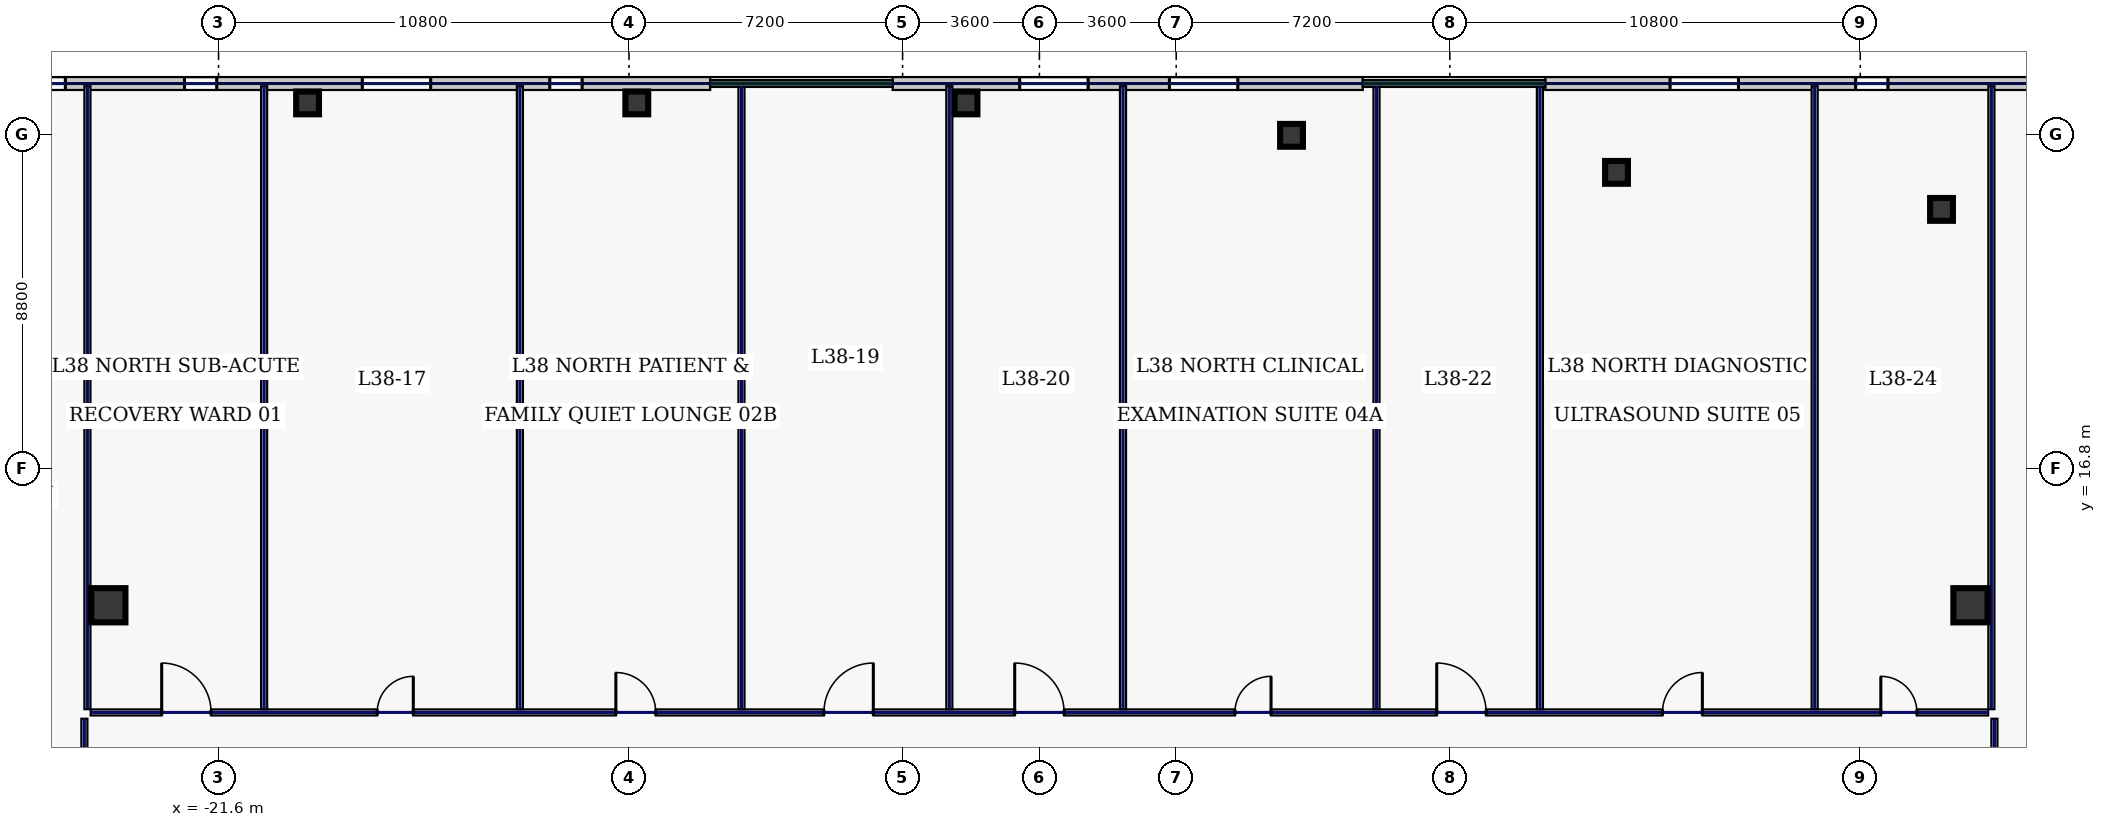
"""IFC4 building model, lengths in metres.
Left out: names, types, materials, properties, quantities, classifications, styles, units other than length and angle.
Written with IfcOpenShell. Run it as: python <this file> out.ifc"""

import sys

from ifc_helpers import new_model, si_unit, direction, frame, frame_2d, origin, origin_2d, place, context, subcontext, project, spatial, rectangle, hollow_rectangle, extrude, element, fill, save


model = new_model("IFC4")
c1 = context("Model", 3, precision=1e-05, world=origin(), true_north=direction((0.0, 1.0)))
c2 = subcontext(c1, "Body", "Model", "MODEL_VIEW")
j1 = project(units=[si_unit("LENGTHUNIT", "METRE"), si_unit("PLANEANGLEUNIT", "RADIAN")], contexts=[c1])
p1 = place(None, origin())
s1 = spatial("IfcSite", under=j1, at=p1, CompositionType="ELEMENT")
p2 = place(p1, origin())
s2 = spatial("IfcBuilding", under=s1, at=p2, CompositionType="ELEMENT")
p3 = place(p2, frame((0.0, 0.0, 168.2)))
s3 = spatial("IfcBuildingStorey", under=s2, at=p3, CompositionType="ELEMENT", Elevation=168.2)
for number, where, z_axis, x_axis in (
    (1, (-24.5, 13.2, 0.0), (0.0, 0.0, 1.0), (1.0, 0.0, 0.0)),
    (2, (24.5, 13.2, 0.0), (0.0, 0.0, 1.0), (1.0, 0.0, 0.0)),
):
    element("IfcColumn", number, at=place(p3, frame(where, z_axis=z_axis, x_axis=x_axis)), inside=s3, PredefinedType="COLUMN", context=c2, shape_type="SweptSolid", body=[
        extrude(hollow_rectangle(XDim=0.9, YDim=0.9, WallThickness=0.04, at=origin_2d()), origin(), (0.0, 0.0, 1.0), 3.74),
    ])
for number, where, z_axis, x_axis in (
    (3, (23.738, 23.618, 0.0), (0.0, 0.0, 1.0), (1.0, 0.0, 0.0)),
    (4, (15.186, 24.592, 0.0), (0.0, 0.0, 1.0), (1.0, 0.0, 0.0)),
    (5, (6.634, 25.567, 0.0), (0.0, 0.0, 1.0), (1.0, 0.0, 0.0)),
    (6, (-1.931, 26.42, 0.0), (0.0, 0.0, 1.0), (1.0, 0.0, 0.0)),
    (7, (-10.594, 26.42, 0.0), (0.0, 0.0, 1.0), (1.0, 0.0, 0.0)),
    (8, (-19.257, 26.42, 0.0), (0.0, 0.0, 1.0), (1.0, 0.0, 0.0)),
):
    element("IfcColumn", number, at=place(p3, frame(where, z_axis=z_axis, x_axis=x_axis)), inside=s3, PredefinedType="COLUMN", context=c2, shape_type="SweptSolid", body=[
        extrude(hollow_rectangle(XDim=0.6, YDim=0.6, WallThickness=0.028, at=origin_2d()), origin(), (0.0, 0.0, 1.0), 3.74),
    ])
p4 = place(p3, frame((33.4, 26.93, 0.0), z_axis=(0.0, 0.0, 1.0), x_axis=(-1.0, 0.0, 0.0)))
e9 = element("IfcWall", 9, at=p4, inside=s3, PredefinedType="STANDARD", context=c2, shape_type="SweptSolid", body=[
    extrude(rectangle(XDim=20.09, YDim=0.34, at=frame_2d((10.045, 0.0))), origin(), (0.0, 0.0, 1.0), 3.74),
])
p5 = place(p4, frame((15.005, 0.0, 0.7)))
e10 = element("IfcOpeningElement", 10, at=p5, cuts=e9, PredefinedType="OPENING", context=c2, shape_type="SweptSolid", body=[
    extrude(rectangle(XDim=1.8, YDim=2.2, at=frame_2d((0.9, 1.1))), frame((0.0, 0.18, 0.0), z_axis=(0.0, -1.0, 0.0), x_axis=(1.0, 0.0, 0.0)), (0.0, 0.0, 1.0), 0.36),
])
p6 = place(p4, frame((11.071, 0.0, 0.7)))
e11 = element("IfcOpeningElement", 11, at=p6, cuts=e9, PredefinedType="OPENING", context=c2, shape_type="SweptSolid", body=[
    extrude(rectangle(XDim=0.85, YDim=1.85, at=frame_2d((0.425, 0.925))), frame((0.0, 0.18, 0.0), z_axis=(0.0, -1.0, 0.0), x_axis=(1.0, 0.0, 0.0)), (0.0, 0.0, 1.0), 0.36),
])
p7 = place(p4, frame((6.48, 0.0, 0.7)))
e12 = element("IfcOpeningElement", 12, at=p7, cuts=e9, PredefinedType="OPENING", context=c2, shape_type="SweptSolid", body=[
    extrude(rectangle(XDim=0.85, YDim=1.85, at=frame_2d((0.425, 0.925))), frame((0.0, 0.18, 0.0), z_axis=(0.0, -1.0, 0.0), x_axis=(1.0, 0.0, 0.0)), (0.0, 0.0, 1.0), 0.36),
])
p8 = place(p4, frame((2.591, 0.0, 0.7)))
e13 = element("IfcOpeningElement", 13, at=p8, cuts=e9, PredefinedType="OPENING", context=c2, shape_type="SweptSolid", body=[
    extrude(rectangle(XDim=1.8, YDim=2.2, at=frame_2d((0.9, 1.1))), frame((0.0, 0.18, 0.0), z_axis=(0.0, -1.0, 0.0), x_axis=(1.0, 0.0, 0.0)), (0.0, 0.0, 1.0), 0.36),
])
p9 = place(p3, frame((8.51, 26.93, 0.0), z_axis=(0.0, 0.0, 1.0), x_axis=(-1.0, 0.0, 0.0)))
e14 = element("IfcWall", 14, at=p9, inside=s3, PredefinedType="STANDARD", context=c2, shape_type="SweptSolid", body=[
    extrude(rectangle(XDim=12.373, YDim=0.34, at=frame_2d((6.187, 0.0))), origin(), (0.0, 0.0, 1.0), 3.74),
])
p10 = place(p9, frame((7.229, 0.0, 0.7)))
e15 = element("IfcOpeningElement", 15, at=p10, cuts=e14, PredefinedType="OPENING", context=c2, shape_type="SweptSolid", body=[
    extrude(rectangle(XDim=1.8, YDim=2.2, at=frame_2d((0.9, 1.1))), frame((0.0, 0.18, 0.0), z_axis=(0.0, -1.0, 0.0), x_axis=(1.0, 0.0, 0.0)), (0.0, 0.0, 1.0), 0.36),
])
p11 = place(p9, frame((3.289, 0.0, 0.7)))
e16 = element("IfcOpeningElement", 16, at=p11, cuts=e14, PredefinedType="OPENING", context=c2, shape_type="SweptSolid", body=[
    extrude(rectangle(XDim=1.8, YDim=2.2, at=frame_2d((0.9, 1.1))), frame((0.0, 0.18, 0.0), z_axis=(0.0, -1.0, 0.0), x_axis=(1.0, 0.0, 0.0)), (0.0, 0.0, 1.0), 0.36),
])
p12 = place(p3, frame((-8.663, 26.93, 0.0), z_axis=(0.0, 0.0, 1.0), x_axis=(-1.0, 0.0, 0.0)))
e17 = element("IfcWall", 17, at=p12, inside=s3, PredefinedType="STANDARD", context=c2, shape_type="SweptSolid", body=[
    extrude(rectangle(XDim=19.937, YDim=0.34, at=frame_2d((9.969, 0.0))), origin(), (0.0, 0.0, 1.0), 3.74),
])
p13 = place(p12, frame((16.968, 0.0, 0.7)))
e18 = element("IfcOpeningElement", 18, at=p13, cuts=e17, PredefinedType="OPENING", context=c2, shape_type="SweptSolid", body=[
    extrude(rectangle(XDim=0.85, YDim=1.85, at=frame_2d((0.425, 0.925))), frame((0.0, 0.18, 0.0), z_axis=(0.0, -1.0, 0.0), x_axis=(1.0, 0.0, 0.0)), (0.0, 0.0, 1.0), 0.36),
])
p14 = place(p12, frame((12.983, 0.0, 0.7)))
e19 = element("IfcOpeningElement", 19, at=p14, cuts=e17, PredefinedType="OPENING", context=c2, shape_type="SweptSolid", body=[
    extrude(rectangle(XDim=0.85, YDim=1.85, at=frame_2d((0.425, 0.925))), frame((0.0, 0.18, 0.0), z_axis=(0.0, -1.0, 0.0), x_axis=(1.0, 0.0, 0.0)), (0.0, 0.0, 1.0), 0.36),
])
p15 = place(p12, frame((7.355, 0.0, 0.7)))
e20 = element("IfcOpeningElement", 20, at=p15, cuts=e17, PredefinedType="OPENING", context=c2, shape_type="SweptSolid", body=[
    extrude(rectangle(XDim=1.8, YDim=2.2, at=frame_2d((0.9, 1.1))), frame((0.0, 0.18, 0.0), z_axis=(0.0, -1.0, 0.0), x_axis=(1.0, 0.0, 0.0)), (0.0, 0.0, 1.0), 0.36),
])
p16 = place(p12, frame((3.371, 0.0, 0.7)))
e21 = element("IfcOpeningElement", 21, at=p16, cuts=e17, PredefinedType="OPENING", context=c2, shape_type="SweptSolid", body=[
    extrude(rectangle(XDim=0.85, YDim=1.85, at=frame_2d((0.425, 0.925))), frame((0.0, 0.18, 0.0), z_axis=(0.0, -1.0, 0.0), x_axis=(1.0, 0.0, 0.0)), (0.0, 0.0, 1.0), 0.36),
])
p17 = place(p3, frame((-25.13, 7.235, 0.0), z_axis=(0.0, 0.0, 1.0), x_axis=(0.0, 1.0, 0.0)))
e22 = element("IfcWall", 22, at=p17, inside=s3, PredefinedType="PARTITIONING", context=c2, shape_type="SweptSolid", body=[
    extrude(rectangle(XDim=2.98, YDim=0.16, at=frame_2d((1.49, 0.0))), origin(), (0.0, 0.0, 1.0), 3.74),
])
p18 = place(p17, frame((1.1, 0.0, 0.0)))
e23 = element("IfcOpeningElement", 23, at=p18, cuts=e22, PredefinedType="OPENING", context=c2, shape_type="SweptSolid", body=[
    extrude(rectangle(XDim=0.95, YDim=2.2, at=frame_2d((0.475, 1.1))), frame((0.0, 0.09, 0.0), z_axis=(0.0, -1.0, 0.0), x_axis=(1.0, 0.0, 0.0)), (0.0, 0.0, 1.0), 0.18),
])
p19 = place(p3, frame((-24.965, 10.38, 0.0), z_axis=(0.0, 0.0, 1.0), x_axis=(1.0, 0.0, 0.0)))
e24 = element("IfcWall", 24, at=p19, inside=s3, PredefinedType="PARTITIONING", context=c2, shape_type="SweptSolid", body=[
    extrude(rectangle(XDim=49.93, YDim=0.16, at=frame_2d((24.965, 0.0))), origin(), (0.0, 0.0, 1.0), 3.74),
])
p20 = place(p19, frame((1.869, 0.0, 0.0)))
e25 = element("IfcOpeningElement", 25, at=p20, cuts=e24, PredefinedType="OPENING", context=c2, shape_type="SweptSolid", body=[
    extrude(rectangle(XDim=1.3, YDim=2.2, at=frame_2d((0.65, 1.1))), frame((0.0, 0.09, 0.0), z_axis=(0.0, -1.0, 0.0), x_axis=(1.0, 0.0, 0.0)), (0.0, 0.0, 1.0), 0.18),
])
p21 = place(p19, frame((7.54, 0.0, 0.0)))
e26 = element("IfcOpeningElement", 26, at=p21, cuts=e24, PredefinedType="OPENING", context=c2, shape_type="SweptSolid", body=[
    extrude(rectangle(XDim=0.95, YDim=2.2, at=frame_2d((0.475, 1.1))), frame((0.0, 0.09, 0.0), z_axis=(0.0, -1.0, 0.0), x_axis=(1.0, 0.0, 0.0)), (0.0, 0.0, 1.0), 0.18),
])
p22 = place(p19, frame((13.82, 0.0, 0.0)))
e27 = element("IfcOpeningElement", 27, at=p22, cuts=e24, PredefinedType="OPENING", context=c2, shape_type="SweptSolid", body=[
    extrude(rectangle(XDim=1.05, YDim=2.2, at=frame_2d((0.525, 1.1))), frame((0.0, 0.09, 0.0), z_axis=(0.0, -1.0, 0.0), x_axis=(1.0, 0.0, 0.0)), (0.0, 0.0, 1.0), 0.18),
])
p23 = place(p19, frame((19.295, 0.0, 0.0)))
e28 = element("IfcOpeningElement", 28, at=p23, cuts=e24, PredefinedType="OPENING", context=c2, shape_type="SweptSolid", body=[
    extrude(rectangle(XDim=1.3, YDim=2.2, at=frame_2d((0.65, 1.1))), frame((0.0, 0.09, 0.0), z_axis=(0.0, -1.0, 0.0), x_axis=(1.0, 0.0, 0.0)), (0.0, 0.0, 1.0), 0.18),
])
p24 = place(p19, frame((24.315, 0.0, 0.0)))
e29 = element("IfcOpeningElement", 29, at=p24, cuts=e24, PredefinedType="OPENING", context=c2, shape_type="SweptSolid", body=[
    extrude(rectangle(XDim=1.3, YDim=2.2, at=frame_2d((0.65, 1.1))), frame((0.0, 0.09, 0.0), z_axis=(0.0, -1.0, 0.0), x_axis=(1.0, 0.0, 0.0)), (0.0, 0.0, 1.0), 0.18),
])
p25 = place(p19, frame((30.11, 0.0, 0.0)))
e30 = element("IfcOpeningElement", 30, at=p25, cuts=e24, PredefinedType="OPENING", context=c2, shape_type="SweptSolid", body=[
    extrude(rectangle(XDim=0.95, YDim=2.2, at=frame_2d((0.475, 1.1))), frame((0.0, 0.09, 0.0), z_axis=(0.0, -1.0, 0.0), x_axis=(1.0, 0.0, 0.0)), (0.0, 0.0, 1.0), 0.18),
])
p26 = place(p19, frame((35.42, 0.0, 0.0)))
e31 = element("IfcOpeningElement", 31, at=p26, cuts=e24, PredefinedType="OPENING", context=c2, shape_type="SweptSolid", body=[
    extrude(rectangle(XDim=1.3, YDim=2.2, at=frame_2d((0.65, 1.1))), frame((0.0, 0.09, 0.0), z_axis=(0.0, -1.0, 0.0), x_axis=(1.0, 0.0, 0.0)), (0.0, 0.0, 1.0), 0.18),
])
p27 = place(p19, frame((41.36, 0.0, 0.0)))
e32 = element("IfcOpeningElement", 32, at=p27, cuts=e24, PredefinedType="OPENING", context=c2, shape_type="SweptSolid", body=[
    extrude(rectangle(XDim=1.05, YDim=2.2, at=frame_2d((0.525, 1.1))), frame((0.0, 0.09, 0.0), z_axis=(0.0, -1.0, 0.0), x_axis=(1.0, 0.0, 0.0)), (0.0, 0.0, 1.0), 0.18),
])
p28 = place(p19, frame((47.106, 0.0, 0.0)))
e33 = element("IfcOpeningElement", 33, at=p28, cuts=e24, PredefinedType="OPENING", context=c2, shape_type="SweptSolid", body=[
    extrude(rectangle(XDim=0.95, YDim=2.2, at=frame_2d((0.475, 1.1))), frame((0.0, 0.09, 0.0), z_axis=(0.0, -1.0, 0.0), x_axis=(1.0, 0.0, 0.0)), (0.0, 0.0, 1.0), 0.18),
])
p29 = place(p3, frame((25.13, 10.215, 0.0), z_axis=(0.0, 0.0, 1.0), x_axis=(0.0, -1.0, 0.0)))
e34 = element("IfcWall", 34, at=p29, inside=s3, PredefinedType="PARTITIONING", context=c2, shape_type="SweptSolid", body=[
    extrude(rectangle(XDim=2.98, YDim=0.16, at=frame_2d((1.49, 0.0))), origin(), (0.0, 0.0, 1.0), 3.74),
])
p30 = place(p29, frame((1.1, 0.0, 0.0)))
e35 = element("IfcOpeningElement", 35, at=p30, cuts=e34, PredefinedType="OPENING", context=c2, shape_type="SweptSolid", body=[
    extrude(rectangle(XDim=0.95, YDim=2.2, at=frame_2d((0.475, 1.1))), frame((0.0, 0.09, 0.0), z_axis=(0.0, -1.0, 0.0), x_axis=(1.0, 0.0, 0.0)), (0.0, 0.0, 1.0), 0.18),
])
p31 = place(p3, frame((-25.05, 10.465, 0.0), z_axis=(0.0, 0.0, 1.0), x_axis=(0.0, 1.0, 0.0)))
e36 = element("IfcWall", 36, at=p31, inside=s3, PredefinedType="PARTITIONING", context=c2, shape_type="SweptSolid", body=[
    extrude(rectangle(XDim=16.395, YDim=0.16, at=frame_2d((8.198, 0.0))), origin(), (0.0, 0.0, 1.0), 3.285),
])
for number, where, z_axis, x_axis in (
    (37, (25.05, 10.465, 0.0), (0.0, 0.0, 1.0), (0.0, 1.0, 0.0)),
    (38, (-20.4, 10.465, 0.0), (0.0, 0.0, 1.0), (0.0, 1.0, 0.0)),
    (39, (-7.84, 10.465, 0.0), (0.0, 0.0, 1.0), (0.0, 1.0, 0.0)),
    (40, (2.2, 10.465, 0.0), (0.0, 0.0, 1.0), (0.0, 1.0, 0.0)),
    (41, (13.17, 10.465, 0.0), (0.0, 0.0, 1.0), (0.0, 1.0, 0.0)),
    (42, (20.4, 10.465, 0.0), (0.0, 0.0, 1.0), (0.0, 1.0, 0.0)),
    (43, (-13.67, 10.465, 0.0), (0.0, 0.0, 1.0), (0.0, 1.0, 0.0)),
):
    element("IfcWall", number, at=place(p3, frame(where, z_axis=z_axis, x_axis=x_axis)), inside=s3, PredefinedType="PARTITIONING", context=c2, shape_type="SweptSolid", body=[
        extrude(rectangle(XDim=16.395, YDim=0.16, at=frame_2d((8.198, 0.0))), origin(), (0.0, 0.0, 1.0), 3.74),
    ])
p32 = place(p3, frame((-2.37, 10.465, 0.0), z_axis=(0.0, 0.0, 1.0), x_axis=(0.0, 1.0, 0.0)))
e44 = element("IfcWall", 44, at=p32, inside=s3, PredefinedType="PARTITIONING", context=c2, shape_type="SweptSolid", body=[
    extrude(rectangle(XDim=16.395, YDim=0.16, at=frame_2d((8.198, 0.0))), origin(), (0.0, 0.0, 1.0), 3.285),
])
p33 = place(p3, frame((8.87, 10.465, 0.0), z_axis=(0.0, 0.0, 1.0), x_axis=(0.0, 1.0, 0.0)))
e45 = element("IfcWall", 45, at=p33, inside=s3, PredefinedType="PARTITIONING", context=c2, shape_type="SweptSolid", body=[
    extrude(rectangle(XDim=16.395, YDim=0.16, at=frame_2d((8.198, 0.0))), origin(), (0.0, 0.0, 1.0), 3.74),
])
p34 = place(p5, origin())
e46 = element("IfcWindow", 46, at=p34, inside=s3, PartitioningType="SINGLE_PANEL", PredefinedType="WINDOW", context=c2, shape_type="SweptSolid", body=[
    extrude(rectangle(XDim=1.8, YDim=2.2, at=frame_2d((0.9, 1.1))), frame((0.0, 0.03, 0.0), z_axis=(0.0, -1.0, 0.0), x_axis=(1.0, 0.0, 0.0)), (0.0, 0.0, 1.0), 0.06),
])
fill(e10, e46)
p35 = place(p6, origin())
e47 = element("IfcWindow", 47, at=p35, inside=s3, PartitioningType="SINGLE_PANEL", PredefinedType="WINDOW", context=c2, shape_type="SweptSolid", body=[
    extrude(rectangle(XDim=0.85, YDim=1.85, at=frame_2d((0.425, 0.925))), frame((0.0, 0.03, 0.0), z_axis=(0.0, -1.0, 0.0), x_axis=(1.0, 0.0, 0.0)), (0.0, 0.0, 1.0), 0.06),
])
fill(e11, e47)
p36 = place(p10, origin())
e48 = element("IfcWindow", 48, at=p36, inside=s3, PartitioningType="SINGLE_PANEL", PredefinedType="WINDOW", context=c2, shape_type="SweptSolid", body=[
    extrude(rectangle(XDim=1.8, YDim=2.2, at=frame_2d((0.9, 1.1))), frame((0.0, 0.03, 0.0), z_axis=(0.0, -1.0, 0.0), x_axis=(1.0, 0.0, 0.0)), (0.0, 0.0, 1.0), 0.06),
])
fill(e15, e48)
p37 = place(p11, origin())
e49 = element("IfcWindow", 49, at=p37, inside=s3, PartitioningType="SINGLE_PANEL", PredefinedType="WINDOW", context=c2, shape_type="SweptSolid", body=[
    extrude(rectangle(XDim=1.8, YDim=2.2, at=frame_2d((0.9, 1.1))), frame((0.0, 0.03, 0.0), z_axis=(0.0, -1.0, 0.0), x_axis=(1.0, 0.0, 0.0)), (0.0, 0.0, 1.0), 0.06),
])
fill(e16, e49)
p38 = place(p13, origin())
e50 = element("IfcWindow", 50, at=p38, inside=s3, PartitioningType="SINGLE_PANEL", PredefinedType="WINDOW", context=c2, shape_type="SweptSolid", body=[
    extrude(rectangle(XDim=0.85, YDim=1.85, at=frame_2d((0.425, 0.925))), frame((0.0, 0.03, 0.0), z_axis=(0.0, -1.0, 0.0), x_axis=(1.0, 0.0, 0.0)), (0.0, 0.0, 1.0), 0.06),
])
fill(e18, e50)
p39 = place(p14, origin())
e51 = element("IfcWindow", 51, at=p39, inside=s3, PartitioningType="SINGLE_PANEL", PredefinedType="WINDOW", context=c2, shape_type="SweptSolid", body=[
    extrude(rectangle(XDim=0.85, YDim=1.85, at=frame_2d((0.425, 0.925))), frame((0.0, 0.03, 0.0), z_axis=(0.0, -1.0, 0.0), x_axis=(1.0, 0.0, 0.0)), (0.0, 0.0, 1.0), 0.06),
])
fill(e19, e51)
p40 = place(p15, origin())
e52 = element("IfcWindow", 52, at=p40, inside=s3, PartitioningType="SINGLE_PANEL", PredefinedType="WINDOW", context=c2, shape_type="SweptSolid", body=[
    extrude(rectangle(XDim=1.8, YDim=2.2, at=frame_2d((0.9, 1.1))), frame((0.0, 0.03, 0.0), z_axis=(0.0, -1.0, 0.0), x_axis=(1.0, 0.0, 0.0)), (0.0, 0.0, 1.0), 0.06),
])
fill(e20, e52)
p41 = place(p16, origin())
e53 = element("IfcWindow", 53, at=p41, inside=s3, PartitioningType="SINGLE_PANEL", PredefinedType="WINDOW", context=c2, shape_type="SweptSolid", body=[
    extrude(rectangle(XDim=0.85, YDim=1.85, at=frame_2d((0.425, 0.925))), frame((0.0, 0.03, 0.0), z_axis=(0.0, -1.0, 0.0), x_axis=(1.0, 0.0, 0.0)), (0.0, 0.0, 1.0), 0.06),
])
fill(e21, e53)
p42 = place(p20, origin())
e54 = element("IfcDoor", 54, at=p42, inside=s3, OperationType="SINGLE_SWING_LEFT", PredefinedType="DOOR", context=c2, shape_type="SweptSolid", body=[
    extrude(rectangle(XDim=1.3, YDim=2.2, at=frame_2d((0.65, 1.1))), frame((0.0, 0.025, 0.0), z_axis=(0.0, -1.0, 0.0), x_axis=(1.0, 0.0, 0.0)), (0.0, 0.0, 1.0), 0.05),
])
fill(e25, e54)
p43 = place(p21, origin())
e55 = element("IfcDoor", 55, at=p43, inside=s3, OperationType="SINGLE_SWING_RIGHT", PredefinedType="DOOR", context=c2, shape_type="SweptSolid", body=[
    extrude(rectangle(XDim=0.95, YDim=2.2, at=frame_2d((0.475, 1.1))), frame((0.0, 0.025, 0.0), z_axis=(0.0, -1.0, 0.0), x_axis=(1.0, 0.0, 0.0)), (0.0, 0.0, 1.0), 0.05),
])
fill(e26, e55)
p44 = place(p22, origin())
e56 = element("IfcDoor", 56, at=p44, inside=s3, OperationType="SINGLE_SWING_LEFT", PredefinedType="DOOR", context=c2, shape_type="SweptSolid", body=[
    extrude(rectangle(XDim=1.05, YDim=2.2, at=frame_2d((0.525, 1.1))), frame((0.0, 0.025, 0.0), z_axis=(0.0, -1.0, 0.0), x_axis=(1.0, 0.0, 0.0)), (0.0, 0.0, 1.0), 0.05),
])
fill(e27, e56)
p45 = place(p23, origin())
e57 = element("IfcDoor", 57, at=p45, inside=s3, OperationType="SINGLE_SWING_RIGHT", PredefinedType="DOOR", context=c2, shape_type="SweptSolid", body=[
    extrude(rectangle(XDim=1.3, YDim=2.2, at=frame_2d((0.65, 1.1))), frame((0.0, 0.025, 0.0), z_axis=(0.0, -1.0, 0.0), x_axis=(1.0, 0.0, 0.0)), (0.0, 0.0, 1.0), 0.05),
])
fill(e28, e57)
p46 = place(p24, origin())
e58 = element("IfcDoor", 58, at=p46, inside=s3, OperationType="SINGLE_SWING_LEFT", PredefinedType="DOOR", context=c2, shape_type="SweptSolid", body=[
    extrude(rectangle(XDim=1.3, YDim=2.2, at=frame_2d((0.65, 1.1))), frame((0.0, 0.025, 0.0), z_axis=(0.0, -1.0, 0.0), x_axis=(1.0, 0.0, 0.0)), (0.0, 0.0, 1.0), 0.05),
])
fill(e29, e58)
p47 = place(p25, origin())
e59 = element("IfcDoor", 59, at=p47, inside=s3, OperationType="SINGLE_SWING_RIGHT", PredefinedType="DOOR", context=c2, shape_type="SweptSolid", body=[
    extrude(rectangle(XDim=0.95, YDim=2.2, at=frame_2d((0.475, 1.1))), frame((0.0, 0.025, 0.0), z_axis=(0.0, -1.0, 0.0), x_axis=(1.0, 0.0, 0.0)), (0.0, 0.0, 1.0), 0.05),
])
fill(e30, e59)
p48 = place(p26, origin())
e60 = element("IfcDoor", 60, at=p48, inside=s3, OperationType="SINGLE_SWING_LEFT", PredefinedType="DOOR", context=c2, shape_type="SweptSolid", body=[
    extrude(rectangle(XDim=1.3, YDim=2.2, at=frame_2d((0.65, 1.1))), frame((0.0, 0.025, 0.0), z_axis=(0.0, -1.0, 0.0), x_axis=(1.0, 0.0, 0.0)), (0.0, 0.0, 1.0), 0.05),
])
fill(e31, e60)
p49 = place(p27, origin())
e61 = element("IfcDoor", 61, at=p49, inside=s3, OperationType="SINGLE_SWING_RIGHT", PredefinedType="DOOR", context=c2, shape_type="SweptSolid", body=[
    extrude(rectangle(XDim=1.05, YDim=2.2, at=frame_2d((0.525, 1.1))), frame((0.0, 0.025, 0.0), z_axis=(0.0, -1.0, 0.0), x_axis=(1.0, 0.0, 0.0)), (0.0, 0.0, 1.0), 0.05),
])
fill(e32, e61)
p50 = place(p28, origin())
e62 = element("IfcDoor", 62, at=p50, inside=s3, OperationType="SINGLE_SWING_LEFT", PredefinedType="DOOR", context=c2, shape_type="SweptSolid", body=[
    extrude(rectangle(XDim=0.95, YDim=2.2, at=frame_2d((0.475, 1.1))), frame((0.0, 0.025, 0.0), z_axis=(0.0, -1.0, 0.0), x_axis=(1.0, 0.0, 0.0)), (0.0, 0.0, 1.0), 0.05),
])
fill(e33, e62)
save(model, sys.argv[1])
